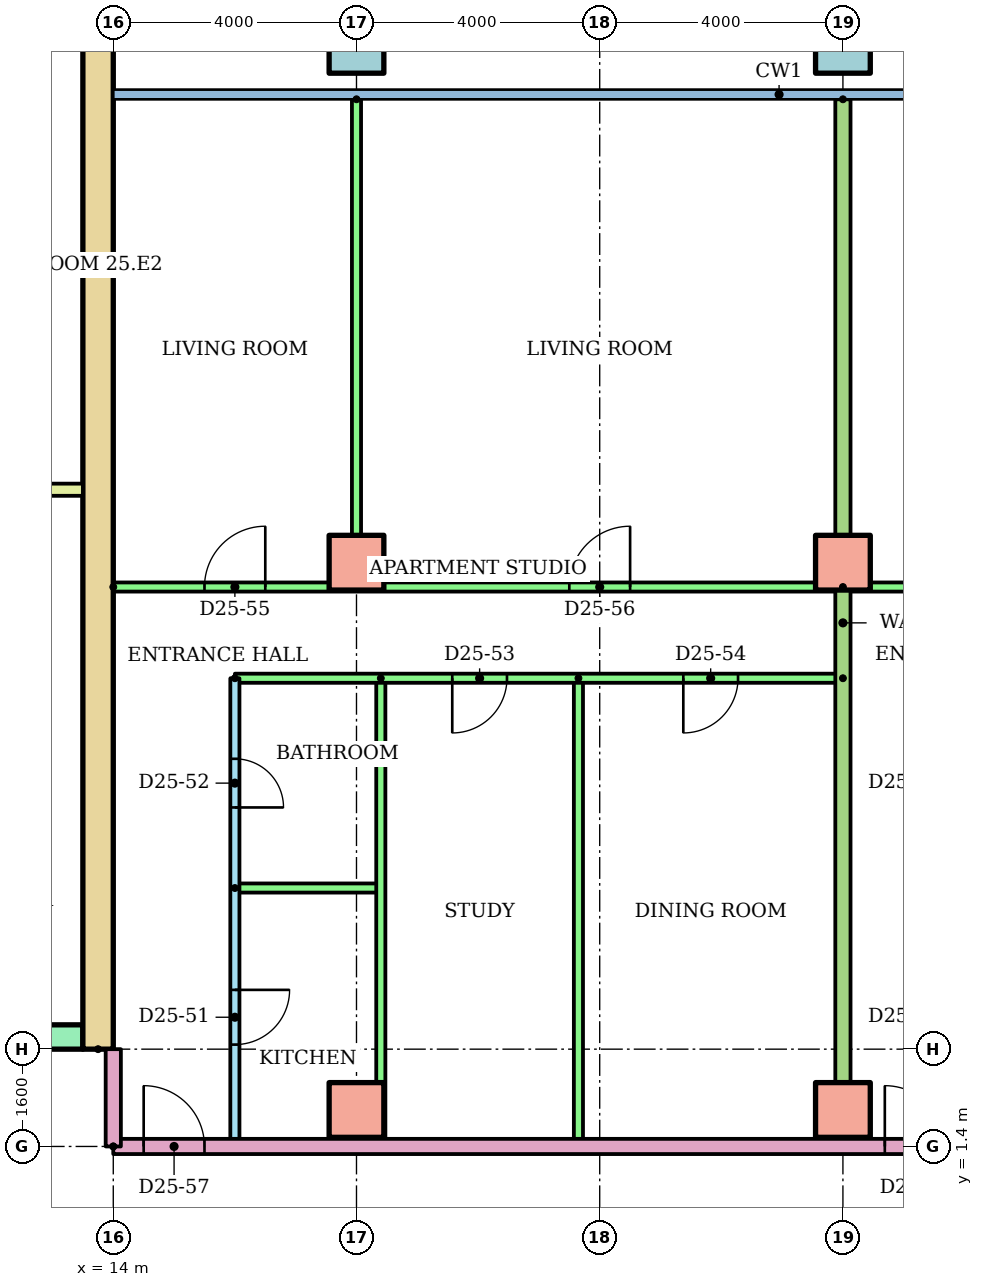
"""IFC4 building model, lengths in metres.
Left out: names, types, materials, properties, quantities, classifications, styles, units other than length and angle.
Written with IfcOpenShell. Run it as: python <this file> out.ifc"""

import sys

from ifc_helpers import new_model, si_unit, direction, frame, frame_2d, origin, origin_2d, place, context, subcontext, project, spatial, rectangle, hollow_rectangle, extrude, element, fill, save


model = new_model("IFC4")
c1 = context("Model", 3, precision=1e-05, world=origin(), true_north=direction((0.0, 1.0)))
c2 = subcontext(c1, "Body", "Model", "MODEL_VIEW")
j1 = project(units=[si_unit("LENGTHUNIT", "METRE"), si_unit("PLANEANGLEUNIT", "RADIAN")], contexts=[c1])
p1 = place(None, origin())
s1 = spatial("IfcSite", under=j1, at=p1, CompositionType="ELEMENT")
p2 = place(p1, origin())
s2 = spatial("IfcBuilding", under=s1, at=p2, CompositionType="ELEMENT")
p3 = place(p2, frame((0.0, 0.0, 96.7)))
s3 = spatial("IfcBuildingStorey", under=s2, at=p3, CompositionType="ELEMENT", Elevation=96.7)
for number, where in (
    (1, (18.0, 2.0, 0.0)),
    (2, (26.0, 2.0, 0.0)),
    (3, (18.0, 11.0, 0.0)),
    (4, (26.0, 11.0, 0.0)),
):
    element("IfcColumn", number, at=place(p3, frame(where)), inside=s3, PredefinedType="COLUMN", context=c2, shape_type="SweptSolid", body=[
        extrude(rectangle(XDim=0.9, YDim=0.9, at=origin_2d()), origin(), (0.0, 0.0, 1.0), 3.2),
    ])
for number, where in (
    (5, (18.0, 19.5, 0.0)),
    (6, (26.0, 19.5, 0.0)),
):
    element("IfcColumn", number, at=place(p3, frame(where)), inside=s3, PredefinedType="COLUMN", context=c2, shape_type="SweptSolid", body=[
        extrude(hollow_rectangle(XDim=0.9, YDim=0.9, WallThickness=0.045, at=origin_2d()), origin(), (0.0, 0.0, 1.0), 3.2),
    ])
p4 = place(p3, frame((13.75, 3.0, 0.0), z_axis=(0.0, 0.0, 1.0), x_axis=(0.0, 1.0, 0.0)))
e7 = element("IfcWall", 7, at=p4, inside=s3, PredefinedType="SHEAR", context=c2, shape_type="SweptSolid", body=[
    extrude(rectangle(XDim=17.0, YDim=0.5, at=frame_2d((8.5, 0.0))), origin(), (0.0, 0.0, 1.0), 2.92),
])
p5 = place(p3, frame((-13.5, 3.2, 0.0)))
e8 = element("IfcWall", 8, at=p5, inside=s3, PredefinedType="SHEAR", context=c2, shape_type="SweptSolid", body=[
    extrude(rectangle(XDim=27.0, YDim=0.4, at=frame_2d((13.5, 0.0))), origin(), (0.0, 0.0, 1.0), 2.92),
])
p6 = place(p5, frame((6.861, 0.0, 0.0)))
e9 = element("IfcOpeningElement", 9, at=p6, cuts=e8, PredefinedType="OPENING", context=c2, shape_type="SweptSolid", body=[
    extrude(rectangle(XDim=1.1, YDim=2.1, at=frame_2d((0.55, 1.05))), frame((0.0, 0.21, 0.0), z_axis=(0.0, -1.0, 0.0), x_axis=(1.0, 0.0, 0.0)), (0.0, 0.0, 1.0), 0.42),
])
p7 = place(p5, frame((9.906, 0.0, 0.0)))
e10 = element("IfcOpeningElement", 10, at=p7, cuts=e8, PredefinedType="OPENING", context=c2, shape_type="SweptSolid", body=[
    extrude(rectangle(XDim=1.1, YDim=2.1, at=frame_2d((0.55, 1.05))), frame((0.0, 0.21, 0.0), z_axis=(0.0, -1.0, 0.0), x_axis=(1.0, 0.0, 0.0)), (0.0, 0.0, 1.0), 0.42),
])
p8 = place(p5, frame((15.994, 0.0, 0.0)))
e11 = element("IfcOpeningElement", 11, at=p8, cuts=e8, PredefinedType="OPENING", context=c2, shape_type="SweptSolid", body=[
    extrude(rectangle(XDim=1.1, YDim=2.1, at=frame_2d((0.55, 1.05))), frame((0.0, 0.21, 0.0), z_axis=(0.0, -1.0, 0.0), x_axis=(1.0, 0.0, 0.0)), (0.0, 0.0, 1.0), 0.42),
])
p9 = place(p5, frame((19.039, 0.0, 0.0)))
e12 = element("IfcOpeningElement", 12, at=p9, cuts=e8, PredefinedType="OPENING", context=c2, shape_type="SweptSolid", body=[
    extrude(rectangle(XDim=1.1, YDim=2.1, at=frame_2d((0.55, 1.05))), frame((0.0, 0.21, 0.0), z_axis=(0.0, -1.0, 0.0), x_axis=(1.0, 0.0, 0.0)), (0.0, 0.0, 1.0), 0.42),
])
p10 = place(p5, frame((12.6, 0.0, 0.0)))
e13 = element("IfcOpeningElement", 13, at=p10, cuts=e8, PredefinedType="OPENING", context=c2, shape_type="SweptSolid", body=[
    extrude(rectangle(XDim=1.8, YDim=2.1, at=frame_2d((0.9, 1.05))), frame((0.0, 0.21, 0.0), z_axis=(0.0, -1.0, 0.0), x_axis=(1.0, 0.0, 0.0)), (0.0, 0.0, 1.0), 0.42),
])
p11 = place(p3, frame((9.6, 12.2, 0.0)))
e14 = element("IfcWall", 14, at=p11, inside=s3, PredefinedType="PARTITIONING", context=c2, shape_type="SweptSolid", body=[
    extrude(rectangle(XDim=3.9, YDim=0.2, at=frame_2d((1.95, 0.0))), origin(), (0.0, 0.0, 1.0), 2.92),
])
p12 = place(p3, frame((16.0, 9.1, 0.0), z_axis=(0.0, 0.0, 1.0), x_axis=(0.0, -1.0, 0.0)))
e15 = element("IfcWall", 15, at=p12, inside=s3, PredefinedType="PARTITIONING", context=c2, shape_type="SweptSolid", body=[
    extrude(rectangle(XDim=7.7, YDim=0.15, at=frame_2d((3.85, 0.0))), origin(), (0.0, 0.0, 1.0), 2.4),
])
p13 = place(p12, frame((5.125, 0.0, 0.0)))
e16 = element("IfcOpeningElement", 16, at=p13, cuts=e15, PredefinedType="OPENING", context=c2, shape_type="SweptSolid", body=[
    extrude(rectangle(XDim=0.9, YDim=2.1, at=frame_2d((0.45, 1.05))), frame((0.0, 0.085, 0.0), z_axis=(0.0, -1.0, 0.0), x_axis=(1.0, 0.0, 0.0)), (0.0, 0.0, 1.0), 0.17),
])
p14 = place(p12, frame((1.325, 0.0, 0.0)))
e17 = element("IfcOpeningElement", 17, at=p14, cuts=e15, PredefinedType="OPENING", context=c2, shape_type="SweptSolid", body=[
    extrude(rectangle(XDim=0.8, YDim=2.1, at=frame_2d((0.4, 1.05))), frame((0.0, 0.085, 0.0), z_axis=(0.0, -1.0, 0.0), x_axis=(1.0, 0.0, 0.0)), (0.0, 0.0, 1.0), 0.17),
])
p15 = place(p3, frame((16.0, 5.65, 0.0)))
e18 = element("IfcWall", 18, at=p15, inside=s3, PredefinedType="PARTITIONING", context=c2, shape_type="SweptSolid", body=[
    extrude(rectangle(XDim=2.4, YDim=0.15, at=frame_2d((1.2, 0.0))), origin(), (0.0, 0.0, 1.0), 2.4),
])
for number, where, z_axis, x_axis in (
    (19, (18.4, 9.1, 0.0), (0.0, 0.0, 1.0), (0.0, -1.0, 0.0)),
    (20, (21.65, 9.1, 0.0), (0.0, 0.0, 1.0), (0.0, -1.0, 0.0)),
):
    element("IfcWall", number, at=place(p3, frame(where, z_axis=z_axis, x_axis=x_axis)), inside=s3, PredefinedType="PARTITIONING", context=c2, shape_type="SweptSolid", body=[
        extrude(rectangle(XDim=7.7, YDim=0.15, at=frame_2d((3.85, 0.0))), origin(), (0.0, 0.0, 1.0), 2.4),
    ])
p16 = place(p3, frame((26.0, 9.1, 0.0), z_axis=(0.0, 0.0, 1.0), x_axis=(-1.0, 0.0, 0.0)))
e21 = element("IfcWall", 21, at=p16, inside=s3, PredefinedType="PARTITIONING", context=c2, shape_type="SweptSolid", body=[
    extrude(rectangle(XDim=10.0, YDim=0.15, at=frame_2d((5.0, 0.0))), origin(), (0.0, 0.0, 1.0), 2.4),
])
p17 = place(p16, frame((5.525, 0.0, 0.0)))
e22 = element("IfcOpeningElement", 22, at=p17, cuts=e21, PredefinedType="OPENING", context=c2, shape_type="SweptSolid", body=[
    extrude(rectangle(XDim=0.9, YDim=2.1, at=frame_2d((0.45, 1.05))), frame((0.0, 0.085, 0.0), z_axis=(0.0, -1.0, 0.0), x_axis=(1.0, 0.0, 0.0)), (0.0, 0.0, 1.0), 0.17),
])
p18 = place(p16, frame((1.725, 0.0, 0.0)))
e23 = element("IfcOpeningElement", 23, at=p18, cuts=e21, PredefinedType="OPENING", context=c2, shape_type="SweptSolid", body=[
    extrude(rectangle(XDim=0.9, YDim=2.1, at=frame_2d((0.45, 1.05))), frame((0.0, 0.085, 0.0), z_axis=(0.0, -1.0, 0.0), x_axis=(1.0, 0.0, 0.0)), (0.0, 0.0, 1.0), 0.17),
])
p19 = place(p3, frame((14.0, 10.6, 0.0)))
e24 = element("IfcWall", 24, at=p19, inside=s3, PredefinedType="PARTITIONING", context=c2, shape_type="SweptSolid", body=[
    extrude(rectangle(XDim=12.0, YDim=0.15, at=frame_2d((6.0, 0.0))), origin(), (0.0, 0.0, 1.0), 2.4),
])
p20 = place(p19, frame((1.5, 0.0, 0.0)))
e25 = element("IfcOpeningElement", 25, at=p20, cuts=e24, PredefinedType="OPENING", context=c2, shape_type="SweptSolid", body=[
    extrude(rectangle(XDim=1.0, YDim=2.1, at=frame_2d((0.5, 1.05))), frame((0.0, 0.085, 0.0), z_axis=(0.0, -1.0, 0.0), x_axis=(1.0, 0.0, 0.0)), (0.0, 0.0, 1.0), 0.17),
])
p21 = place(p19, frame((7.5, 0.0, 0.0)))
e26 = element("IfcOpeningElement", 26, at=p21, cuts=e24, PredefinedType="OPENING", context=c2, shape_type="SweptSolid", body=[
    extrude(rectangle(XDim=1.0, YDim=2.1, at=frame_2d((0.5, 1.05))), frame((0.0, 0.085, 0.0), z_axis=(0.0, -1.0, 0.0), x_axis=(1.0, 0.0, 0.0)), (0.0, 0.0, 1.0), 0.17),
])
p22 = place(p3, frame((18.0, 18.621, 0.0), z_axis=(0.0, 0.0, 1.0), x_axis=(0.0, -1.0, 0.0)))
e27 = element("IfcWall", 27, at=p22, inside=s3, PredefinedType="PARTITIONING", context=c2, shape_type="SweptSolid", body=[
    extrude(rectangle(XDim=8.021, YDim=0.15, at=frame_2d((4.01, 0.0))), origin(), (0.0, 0.0, 1.0), 2.4),
])
p23 = place(p3, frame((26.0, 10.6, 0.0)))
e28 = element("IfcWall", 28, at=p23, inside=s3, PredefinedType="PARTITIONING", context=c2, shape_type="SweptSolid", body=[
    extrude(rectangle(XDim=14.61, YDim=0.15, at=frame_2d((7.305, 0.0))), origin(), (0.0, 0.0, 1.0), 2.4),
])
p24 = place(p23, frame((3.5, 0.0, 0.0)))
e29 = element("IfcOpeningElement", 29, at=p24, cuts=e28, PredefinedType="OPENING", context=c2, shape_type="SweptSolid", body=[
    extrude(rectangle(XDim=1.0, YDim=2.1, at=frame_2d((0.5, 1.05))), frame((0.0, 0.085, 0.0), z_axis=(0.0, -1.0, 0.0), x_axis=(1.0, 0.0, 0.0)), (0.0, 0.0, 1.0), 0.17),
])
p25 = place(p23, frame((10.75, 0.0, 0.0)))
e30 = element("IfcOpeningElement", 30, at=p25, cuts=e28, PredefinedType="OPENING", context=c2, shape_type="SweptSolid", body=[
    extrude(rectangle(XDim=0.9, YDim=2.1, at=frame_2d((0.45, 1.05))), frame((0.0, 0.085, 0.0), z_axis=(0.0, -1.0, 0.0), x_axis=(1.0, 0.0, 0.0)), (0.0, 0.0, 1.0), 0.17),
])
p26 = place(p3, frame((26.0, 18.621, 0.0), z_axis=(0.0, 0.0, 1.0), x_axis=(0.0, -1.0, 0.0)))
e31 = element("IfcWall", 31, at=p26, inside=s3, PredefinedType="PARTITIONING", context=c2, shape_type="SweptSolid", body=[
    extrude(rectangle(XDim=17.221, YDim=0.25, at=frame_2d((8.611, 0.0))), origin(), (0.0, 0.0, 1.0), 2.4),
])
p27 = place(p3, frame((14.0, 1.4, 0.0)))
e32 = element("IfcWall", 32, at=p27, inside=s3, PredefinedType="PARTITIONING", context=c2, shape_type="SweptSolid", body=[
    extrude(rectangle(XDim=15.0, YDim=0.25, at=frame_2d((7.5, 0.0))), origin(), (0.0, 0.0, 1.0), 2.4),
])
p28 = place(p27, frame((0.5, 0.0, 0.0)))
e33 = element("IfcOpeningElement", 33, at=p28, cuts=e32, PredefinedType="OPENING", context=c2, shape_type="SweptSolid", body=[
    extrude(rectangle(XDim=1.0, YDim=2.1, at=frame_2d((0.5, 1.05))), frame((0.0, 0.135, 0.0), z_axis=(0.0, -1.0, 0.0), x_axis=(1.0, 0.0, 0.0)), (0.0, 0.0, 1.0), 0.27),
])
p29 = place(p27, frame((12.689, 0.0, 0.0)))
e34 = element("IfcOpeningElement", 34, at=p29, cuts=e32, PredefinedType="OPENING", context=c2, shape_type="SweptSolid", body=[
    extrude(rectangle(XDim=1.0, YDim=2.1, at=frame_2d((0.5, 1.05))), frame((0.0, 0.135, 0.0), z_axis=(0.0, -1.0, 0.0), x_axis=(1.0, 0.0, 0.0)), (0.0, 0.0, 1.0), 0.27),
])
p30 = place(p3, frame((14.0, 1.4, 0.0), z_axis=(0.0, 0.0, 1.0), x_axis=(0.0, 1.0, 0.0)))
e35 = element("IfcWall", 35, at=p30, inside=s3, PredefinedType="PARTITIONING", context=c2, shape_type="SweptSolid", body=[
    extrude(rectangle(XDim=1.6, YDim=0.25, at=frame_2d((0.8, 0.0))), origin(), (0.0, 0.0, 1.0), 2.4),
])
p31 = place(p13, origin())
e36 = element("IfcDoor", 36, at=p31, inside=s3, OperationType="SINGLE_SWING_LEFT", PredefinedType="DOOR", context=c2, shape_type="SweptSolid", body=[
    extrude(rectangle(XDim=0.9, YDim=2.1, at=frame_2d((0.45, 1.05))), frame((0.0, 0.025, 0.0), z_axis=(0.0, -1.0, 0.0), x_axis=(1.0, 0.0, 0.0)), (0.0, 0.0, 1.0), 0.05),
])
fill(e16, e36)
p32 = place(p14, origin())
e37 = element("IfcDoor", 37, at=p32, inside=s3, OperationType="SINGLE_SWING_RIGHT", PredefinedType="DOOR", context=c2, shape_type="SweptSolid", body=[
    extrude(rectangle(XDim=0.8, YDim=2.1, at=frame_2d((0.4, 1.05))), frame((0.0, 0.025, 0.0), z_axis=(0.0, -1.0, 0.0), x_axis=(1.0, 0.0, 0.0)), (0.0, 0.0, 1.0), 0.05),
])
fill(e17, e37)
p33 = place(p17, origin())
e38 = element("IfcDoor", 38, at=p33, inside=s3, OperationType="SINGLE_SWING_RIGHT", PredefinedType="DOOR", context=c2, shape_type="SweptSolid", body=[
    extrude(rectangle(XDim=0.9, YDim=2.1, at=frame_2d((0.45, 1.05))), frame((0.0, 0.025, 0.0), z_axis=(0.0, -1.0, 0.0), x_axis=(1.0, 0.0, 0.0)), (0.0, 0.0, 1.0), 0.05),
])
fill(e22, e38)
p34 = place(p18, origin())
e39 = element("IfcDoor", 39, at=p34, inside=s3, OperationType="SINGLE_SWING_RIGHT", PredefinedType="DOOR", context=c2, shape_type="SweptSolid", body=[
    extrude(rectangle(XDim=0.9, YDim=2.1, at=frame_2d((0.45, 1.05))), frame((0.0, 0.025, 0.0), z_axis=(0.0, -1.0, 0.0), x_axis=(1.0, 0.0, 0.0)), (0.0, 0.0, 1.0), 0.05),
])
fill(e23, e39)
p35 = place(p20, origin())
e40 = element("IfcDoor", 40, at=p35, inside=s3, OperationType="SINGLE_SWING_RIGHT", PredefinedType="DOOR", context=c2, shape_type="SweptSolid", body=[
    extrude(rectangle(XDim=1.0, YDim=2.1, at=frame_2d((0.5, 1.05))), frame((0.0, 0.025, 0.0), z_axis=(0.0, -1.0, 0.0), x_axis=(1.0, 0.0, 0.0)), (0.0, 0.0, 1.0), 0.05),
])
fill(e25, e40)
p36 = place(p21, origin())
e41 = element("IfcDoor", 41, at=p36, inside=s3, OperationType="SINGLE_SWING_RIGHT", PredefinedType="DOOR", context=c2, shape_type="SweptSolid", body=[
    extrude(rectangle(XDim=1.0, YDim=2.1, at=frame_2d((0.5, 1.05))), frame((0.0, 0.025, 0.0), z_axis=(0.0, -1.0, 0.0), x_axis=(1.0, 0.0, 0.0)), (0.0, 0.0, 1.0), 0.05),
])
fill(e26, e41)
p37 = place(p28, origin())
e42 = element("IfcDoor", 42, at=p37, inside=s3, OperationType="SINGLE_SWING_LEFT", PredefinedType="DOOR", context=c2, shape_type="SweptSolid", body=[
    extrude(rectangle(XDim=1.0, YDim=2.1, at=frame_2d((0.5, 1.05))), frame((0.0, 0.025, 0.0), z_axis=(0.0, -1.0, 0.0), x_axis=(1.0, 0.0, 0.0)), (0.0, 0.0, 1.0), 0.05),
])
fill(e33, e42)
p38 = place(p29, origin())
e43 = element("IfcDoor", 43, at=p38, inside=s3, OperationType="SINGLE_SWING_LEFT", PredefinedType="DOOR", context=c2, shape_type="SweptSolid", body=[
    extrude(rectangle(XDim=1.0, YDim=2.1, at=frame_2d((0.5, 1.05))), frame((0.0, 0.025, 0.0), z_axis=(0.0, -1.0, 0.0), x_axis=(1.0, 0.0, 0.0)), (0.0, 0.0, 1.0), 0.05),
])
fill(e34, e43)
save(model, sys.argv[1])
